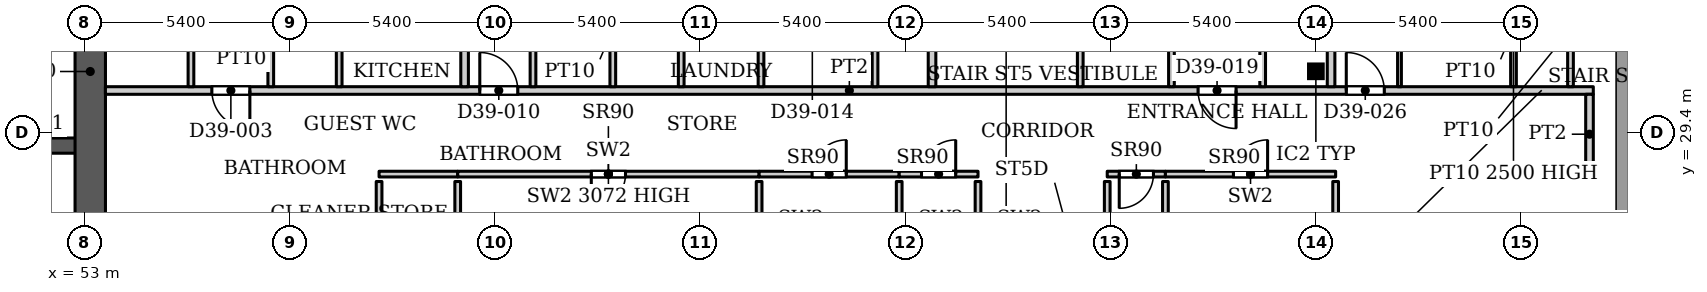
"""IFC4 building model, lengths in metres.
Left out: names, types, materials, properties, quantities, classifications, styles, units other than length and angle.
Written with IfcOpenShell. Run it as: python <this file> out.ifc"""

import sys

from ifc_helpers import new_model, si_unit, direction, frame, frame_2d, origin, origin_2d, place, context, subcontext, project, spatial, rectangle, hollow_rectangle, extrude, source, transform, mapped, element, fill, save


model = new_model("IFC4")
c1 = context("Model", 3, precision=1e-05, world=origin(), true_north=direction((0.0, 1.0)))
c2 = subcontext(c1, "Body", "Model", "MODEL_VIEW")
j1 = project(units=[si_unit("LENGTHUNIT", "METRE"), si_unit("PLANEANGLEUNIT", "RADIAN")], contexts=[c1])
p1 = place(None, origin())
s1 = spatial("IfcSite", under=j1, at=p1, CompositionType="ELEMENT")
p2 = place(p1, origin())
s2 = spatial("IfcBuilding", under=s1, at=p2, CompositionType="ELEMENT")
p3 = place(p2, frame((0.0, 0.0, 172.1)))
s3 = spatial("IfcBuildingStorey", under=s2, at=p3, CompositionType="ELEMENT", Elevation=172.1)
p4 = place(p3, frame((85.4, 31.005, 0.0), z_axis=(0.0, 0.0, 1.0), x_axis=(1.0, 0.0, 0.0)))
e1 = element("IfcColumn", 1, at=p4, inside=s3, PredefinedType="COLUMN", context=c2, shape_type="SweptSolid", body=[
    extrude(hollow_rectangle(XDim=0.305, YDim=0.305, WallThickness=0.016, InnerFilletRadius=0.016, OuterFilletRadius=0.032, at=origin_2d()), origin(), (0.0, 0.0, 1.0), 3.9),
])
p5 = place(p3, frame((34.75, 29.05, 0.0), z_axis=(0.0, 0.0, 1.0), x_axis=(1.0, 0.0, 0.0)))
e2 = element("IfcWall", 2, at=p5, inside=s3, PredefinedType="SHEAR", context=c2, shape_type="SweptSolid", body=[
    extrude(rectangle(XDim=18.4, YDim=0.4, at=frame_2d((9.2, 0.0))), origin(), (0.0, 0.0, 1.0), 3.9),
])
p6 = place(p5, frame((0.875, 0.0, 0.0)))
e3 = element("IfcOpeningElement", 3, at=p6, cuts=e2, PredefinedType="OPENING", context=c2, shape_type="SweptSolid", body=[
    extrude(rectangle(XDim=1.1, YDim=2.2, at=frame_2d((0.55, 1.1))), frame((0.0, 0.21, 0.0), z_axis=(0.0, -1.0, 0.0), x_axis=(1.0, 0.0, 0.0)), (0.0, 0.0, 1.0), 0.42),
])
p7 = place(p5, frame((3.725, 0.0, 0.0)))
e4 = element("IfcOpeningElement", 4, at=p7, cuts=e2, PredefinedType="OPENING", context=c2, shape_type="SweptSolid", body=[
    extrude(rectangle(XDim=1.1, YDim=2.2, at=frame_2d((0.55, 1.1))), frame((0.0, 0.21, 0.0), z_axis=(0.0, -1.0, 0.0), x_axis=(1.0, 0.0, 0.0)), (0.0, 0.0, 1.0), 0.42),
])
p8 = place(p5, frame((6.575, 0.0, 0.0)))
e5 = element("IfcOpeningElement", 5, at=p8, cuts=e2, PredefinedType="OPENING", context=c2, shape_type="SweptSolid", body=[
    extrude(rectangle(XDim=1.1, YDim=2.2, at=frame_2d((0.55, 1.1))), frame((0.0, 0.21, 0.0), z_axis=(0.0, -1.0, 0.0), x_axis=(1.0, 0.0, 0.0)), (0.0, 0.0, 1.0), 0.42),
])
p9 = place(p5, frame((9.425, 0.0, 0.0)))
e6 = element("IfcOpeningElement", 6, at=p9, cuts=e2, PredefinedType="OPENING", context=c2, shape_type="SweptSolid", body=[
    extrude(rectangle(XDim=1.1, YDim=2.2, at=frame_2d((0.55, 1.1))), frame((0.0, 0.21, 0.0), z_axis=(0.0, -1.0, 0.0), x_axis=(1.0, 0.0, 0.0)), (0.0, 0.0, 1.0), 0.42),
])
p10 = place(p5, frame((12.275, 0.0, 0.0)))
e7 = element("IfcOpeningElement", 7, at=p10, cuts=e2, PredefinedType="OPENING", context=c2, shape_type="SweptSolid", body=[
    extrude(rectangle(XDim=1.1, YDim=2.2, at=frame_2d((0.55, 1.1))), frame((0.0, 0.21, 0.0), z_axis=(0.0, -1.0, 0.0), x_axis=(1.0, 0.0, 0.0)), (0.0, 0.0, 1.0), 0.42),
])
p11 = place(p5, frame((15.125, 0.0, 0.0)))
e8 = element("IfcOpeningElement", 8, at=p11, cuts=e2, PredefinedType="OPENING", context=c2, shape_type="SweptSolid", body=[
    extrude(rectangle(XDim=1.1, YDim=2.2, at=frame_2d((0.55, 1.1))), frame((0.0, 0.21, 0.0), z_axis=(0.0, -1.0, 0.0), x_axis=(1.0, 0.0, 0.0)), (0.0, 0.0, 1.0), 0.42),
])
p12 = place(p3, frame((53.15, 25.8, 0.0), z_axis=(0.0, 0.0, 1.0), x_axis=(0.0, 1.0, 0.0)))
e9 = element("IfcWall", 9, at=p12, inside=s3, PredefinedType="SHEAR", context=c2, shape_type="SweptSolid", body=[
    extrude(rectangle(XDim=10.4, YDim=0.8, at=frame_2d((5.2, 0.0))), origin(), (0.0, 0.0, 1.0), 3.9),
])
p13 = place(p3, frame((60.75, 28.3, 0.0), z_axis=(0.0, 0.0, 1.0), x_axis=(1.0, 0.0, 0.0)))
e10 = element("IfcWall", 10, at=p13, inside=s3, PredefinedType="PARTITIONING", context=c2, shape_type="SweptSolid", body=[
    extrude(rectangle(XDim=2.069, YDim=0.15, at=frame_2d((1.035, 0.0))), origin(), (0.0, 0.0, 1.0), 3.9),
])
p14 = place(p3, frame((60.75, 23.075, 0.0), z_axis=(0.0, 0.0, 1.0), x_axis=(0.0, 1.0, 0.0)))
e11 = element("IfcWall", 11, at=p14, inside=s3, PredefinedType="PARTITIONING", context=c2, shape_type="SweptSolid", body=[
    extrude(rectangle(XDim=5.03, YDim=0.15, at=frame_2d((2.515, 0.0))), origin(), (0.0, 0.0, 1.0), 3.9),
])
p15 = place(p14, frame((2.387, 0.0, 0.0)))
e12 = element("IfcOpeningElement", 12, at=p15, cuts=e11, PredefinedType="OPENING", context=c2, shape_type="SweptSolid", body=[
    extrude(rectangle(XDim=0.9, YDim=2.2, at=frame_2d((0.45, 1.1))), frame((0.0, 0.085, 0.0), z_axis=(0.0, -1.0, 0.0), x_axis=(1.0, 0.0, 0.0)), (0.0, 0.0, 1.0), 0.17),
])
p16 = place(p3, frame((62.819, 22.966, 0.0), z_axis=(0.0, 0.0, 1.0), x_axis=(0.0, 1.0, 0.0)))
e13 = element("IfcWall", 13, at=p16, inside=s3, PredefinedType="PARTITIONING", context=c2, shape_type="SweptSolid", body=[
    extrude(rectangle(XDim=5.139, YDim=0.15, at=frame_2d((2.569, 0.0))), origin(), (0.0, 0.0, 1.0), 3.9),
])
p17 = place(p3, frame((62.819, 28.3, 0.0), z_axis=(0.0, 0.0, 1.0), x_axis=(1.0, 0.0, 0.0)))
e14 = element("IfcWall", 14, at=p17, inside=s3, PredefinedType="PARTITIONING", context=c2, shape_type="SweptSolid", body=[
    extrude(rectangle(XDim=7.931, YDim=0.15, at=frame_2d((3.965, 0.0))), origin(), (0.0, 0.0, 1.0), 3.072),
])
p18 = place(p17, frame((3.515, 0.0, 0.0)))
e15 = element("IfcOpeningElement", 15, at=p18, cuts=e14, PredefinedType="OPENING", context=c2, shape_type="SweptSolid", body=[
    extrude(rectangle(XDim=0.9, YDim=2.2, at=frame_2d((0.45, 1.1))), frame((0.0, 0.085, 0.0), z_axis=(0.0, -1.0, 0.0), x_axis=(1.0, 0.0, 0.0)), (0.0, 0.0, 1.0), 0.17),
])
p19 = place(p3, frame((70.75, 26.12, 0.0), z_axis=(0.0, 0.0, 1.0), x_axis=(0.0, 1.0, 0.0)))
e16 = element("IfcWall", 16, at=p19, inside=s3, PredefinedType="PARTITIONING", context=c2, shape_type="SweptSolid", body=[
    extrude(rectangle(XDim=1.985, YDim=0.15, at=frame_2d((0.992, 0.0))), origin(), (0.0, 0.0, 1.0), 3.9),
])
p20 = place(p3, frame((70.75, 28.3, 0.0), z_axis=(0.0, 0.0, 1.0), x_axis=(1.0, 0.0, 0.0)))
e17 = element("IfcWall", 17, at=p20, inside=s3, PredefinedType="PARTITIONING", context=c2, shape_type="SweptSolid", body=[
    extrude(rectangle(XDim=3.686, YDim=0.15, at=frame_2d((1.843, 0.0))), origin(), (0.0, 0.0, 1.0), 3.9),
])
p21 = place(p20, frame((1.393, 0.0, 0.0)))
e18 = element("IfcOpeningElement", 18, at=p21, cuts=e17, PredefinedType="OPENING", context=c2, shape_type="SweptSolid", body=[
    extrude(rectangle(XDim=0.9, YDim=2.2, at=frame_2d((0.45, 1.1))), frame((0.0, 0.085, 0.0), z_axis=(0.0, -1.0, 0.0), x_axis=(1.0, 0.0, 0.0)), (0.0, 0.0, 1.0), 0.17),
])
p22 = place(p3, frame((74.436, 26.12, 0.0), z_axis=(0.0, 0.0, 1.0), x_axis=(0.0, 1.0, 0.0)))
e19 = element("IfcWall", 19, at=p22, inside=s3, PredefinedType="PARTITIONING", context=c2, shape_type="SweptSolid", body=[
    extrude(rectangle(XDim=1.985, YDim=0.15, at=frame_2d((0.992, 0.0))), origin(), (0.0, 0.0, 1.0), 3.9),
])
p23 = place(p3, frame((74.436, 28.3, 0.0), z_axis=(0.0, 0.0, 1.0), x_axis=(1.0, 0.0, 0.0)))
e20 = element("IfcWall", 20, at=p23, inside=s3, PredefinedType="PARTITIONING", context=c2, shape_type="SweptSolid", body=[
    extrude(rectangle(XDim=2.074, YDim=0.15, at=frame_2d((1.037, 0.0))), origin(), (0.0, 0.0, 1.0), 3.9),
])
p24 = place(p23, frame((0.587, 0.0, 0.0)))
e21 = element("IfcOpeningElement", 21, at=p24, cuts=e20, PredefinedType="OPENING", context=c2, shape_type="SweptSolid", body=[
    extrude(rectangle(XDim=0.9, YDim=2.2, at=frame_2d((0.45, 1.1))), frame((0.0, 0.085, 0.0), z_axis=(0.0, -1.0, 0.0), x_axis=(1.0, 0.0, 0.0)), (0.0, 0.0, 1.0), 0.17),
])
p25 = place(p3, frame((76.51, 26.12, 0.0), z_axis=(0.0, 0.0, 1.0), x_axis=(0.0, 1.0, 0.0)))
e22 = element("IfcWall", 22, at=p25, inside=s3, PredefinedType="PARTITIONING", context=c2, shape_type="SweptSolid", body=[
    extrude(rectangle(XDim=1.985, YDim=0.15, at=frame_2d((0.992, 0.0))), origin(), (0.0, 0.0, 1.0), 3.9),
])
p26 = place(p3, frame((79.91, 28.3, 0.0), z_axis=(0.0, 0.0, 1.0), x_axis=(1.0, 0.0, 0.0)))
e23 = element("IfcWall", 23, at=p26, inside=s3, PredefinedType="PARTITIONING", context=c2, shape_type="SweptSolid", body=[
    extrude(rectangle(XDim=1.531, YDim=0.15, at=frame_2d((0.766, 0.0))), origin(), (0.0, 0.0, 1.0), 3.9),
])
p27 = place(p26, frame((0.316, 0.0, 0.0)))
e24 = element("IfcOpeningElement", 24, at=p27, cuts=e23, PredefinedType="OPENING", context=c2, shape_type="SweptSolid", body=[
    extrude(rectangle(XDim=0.9, YDim=2.2, at=frame_2d((0.45, 1.1))), frame((0.0, 0.085, 0.0), z_axis=(0.0, -1.0, 0.0), x_axis=(1.0, 0.0, 0.0)), (0.0, 0.0, 1.0), 0.17),
])
p28 = place(p3, frame((79.91, 26.12, 0.0), z_axis=(0.0, 0.0, 1.0), x_axis=(0.0, 1.0, 0.0)))
e25 = element("IfcWall", 25, at=p28, inside=s3, PredefinedType="PARTITIONING", context=c2, shape_type="SweptSolid", body=[
    extrude(rectangle(XDim=1.985, YDim=0.15, at=frame_2d((0.992, 0.0))), origin(), (0.0, 0.0, 1.0), 3.9),
])
p29 = place(p3, frame((81.441, 25.62, 0.0), z_axis=(0.0, 0.0, 1.0), x_axis=(0.0, 1.0, 0.0)))
e26 = element("IfcWall", 26, at=p29, inside=s3, PredefinedType="PARTITIONING", context=c2, shape_type="SweptSolid", body=[
    extrude(rectangle(XDim=2.485, YDim=0.15, at=frame_2d((1.242, 0.0))), origin(), (0.0, 0.0, 1.0), 3.9),
])
p30 = place(p3, frame((81.441, 28.3, 0.0), z_axis=(0.0, 0.0, 1.0), x_axis=(1.0, 0.0, 0.0)))
e27 = element("IfcWall", 27, at=p30, inside=s3, PredefinedType="PARTITIONING", context=c2, shape_type="SweptSolid", body=[
    extrude(rectangle(XDim=4.479, YDim=0.15, at=frame_2d((2.24, 0.0))), origin(), (0.0, 0.0, 1.0), 3.9),
])
p31 = place(p30, frame((1.789, 0.0, 0.0)))
e28 = element("IfcOpeningElement", 28, at=p31, cuts=e27, PredefinedType="OPENING", context=c2, shape_type="SweptSolid", body=[
    extrude(rectangle(XDim=0.9, YDim=2.2, at=frame_2d((0.45, 1.1))), frame((0.0, 0.085, 0.0), z_axis=(0.0, -1.0, 0.0), x_axis=(1.0, 0.0, 0.0)), (0.0, 0.0, 1.0), 0.17),
])
p32 = place(p3, frame((85.92, 25.62, 0.0), z_axis=(0.0, 0.0, 1.0), x_axis=(0.0, 1.0, 0.0)))
e29 = element("IfcWall", 29, at=p32, inside=s3, PredefinedType="PARTITIONING", context=c2, shape_type="SweptSolid", body=[
    extrude(rectangle(XDim=2.485, YDim=0.15, at=frame_2d((1.242, 0.0))), origin(), (0.0, 0.0, 1.0), 3.9),
])
p33 = place(p3, frame((53.549, 30.5, 0.0), z_axis=(0.0, 0.0, 1.0), x_axis=(1.0, 0.0, 0.0)))
e30 = element("IfcWall", 30, at=p33, inside=s3, PredefinedType="PARTITIONING", context=c2, shape_type="SweptSolid", body=[
    extrude(rectangle(XDim=39.151, YDim=0.2, at=frame_2d((19.575, 0.0))), origin(), (0.0, 0.0, 1.0), 3.6),
])
p34 = place(p33, frame((2.801, 0.0, 0.0)))
e31 = element("IfcOpeningElement", 31, at=p34, cuts=e30, PredefinedType="OPENING", context=c2, shape_type="SweptSolid", body=[
    extrude(rectangle(XDim=1.0, YDim=2.1, at=frame_2d((0.5, 1.05))), frame((0.0, 0.11, 0.0), z_axis=(0.0, -1.0, 0.0), x_axis=(1.0, 0.0, 0.0)), (0.0, 0.0, 1.0), 0.22),
])
p35 = place(p33, frame((9.851, 0.0, 0.0)))
e32 = element("IfcOpeningElement", 32, at=p35, cuts=e30, PredefinedType="OPENING", context=c2, shape_type="SweptSolid", body=[
    extrude(rectangle(XDim=1.0, YDim=2.1, at=frame_2d((0.5, 1.05))), frame((0.0, 0.11, 0.0), z_axis=(0.0, -1.0, 0.0), x_axis=(1.0, 0.0, 0.0)), (0.0, 0.0, 1.0), 0.22),
])
p36 = place(p33, frame((28.751, 0.0, 0.0)))
e33 = element("IfcOpeningElement", 33, at=p36, cuts=e30, PredefinedType="OPENING", context=c2, shape_type="SweptSolid", body=[
    extrude(rectangle(XDim=1.0, YDim=2.1, at=frame_2d((0.5, 1.05))), frame((0.0, 0.11, 0.0), z_axis=(0.0, -1.0, 0.0), x_axis=(1.0, 0.0, 0.0)), (0.0, 0.0, 1.0), 0.22),
])
p37 = place(p33, frame((32.651, 0.0, 0.0)))
e34 = element("IfcOpeningElement", 34, at=p37, cuts=e30, PredefinedType="OPENING", context=c2, shape_type="SweptSolid", body=[
    extrude(rectangle(XDim=1.0, YDim=2.1, at=frame_2d((0.5, 1.05))), frame((0.0, 0.11, 0.0), z_axis=(0.0, -1.0, 0.0), x_axis=(1.0, 0.0, 0.0)), (0.0, 0.0, 1.0), 0.22),
])
p38 = place(p3, frame((55.8, 30.6, 0.0), z_axis=(0.0, 0.0, 1.0), x_axis=(0.0, 1.0, 0.0)))
e35 = element("IfcWall", 35, at=p38, inside=s3, PredefinedType="PARTITIONING", context=c2, shape_type="SweptSolid", body=[
    extrude(rectangle(XDim=3.175, YDim=0.15, at=frame_2d((1.587, 0.0))), origin(), (0.0, 0.0, 1.0), 3.6),
])
for number, where, z_axis, x_axis in (
    (36, (57.9, 30.6, 0.0), (0.0, 0.0, 1.0), (0.0, 1.0, 0.0)),
    (37, (59.7, 30.6, 0.0), (0.0, 0.0, 1.0), (0.0, 1.0, 0.0)),
):
    element("IfcWall", number, at=place(p3, frame(where, z_axis=z_axis, x_axis=x_axis)), inside=s3, PredefinedType="PARTITIONING", context=c2, shape_type="SweptSolid", body=[
        extrude(rectangle(XDim=3.025, YDim=0.15, at=frame_2d((1.512, 0.0))), origin(), (0.0, 0.0, 1.0), 3.6),
    ])
p39 = place(p3, frame((63.0, 30.6, 0.0), z_axis=(0.0, 0.0, 1.0), x_axis=(0.0, 1.0, 0.0)))
e38 = element("IfcWall", 38, at=p39, inside=s3, PredefinedType="PARTITIONING", context=c2, shape_type="SweptSolid", body=[
    extrude(rectangle(XDim=13.3, YDim=0.2, at=frame_2d((6.65, 0.0))), origin(), (0.0, 0.0, 1.0), 3.6),
])
for number, where, z_axis, x_axis in (
    (39, (64.8, 30.6, 0.0), (0.0, 0.0, 1.0), (0.0, 1.0, 0.0)),
    (40, (66.9, 30.6, 0.0), (0.0, 0.0, 1.0), (0.0, 1.0, 0.0)),
    (41, (68.7, 30.6, 0.0), (0.0, 0.0, 1.0), (0.0, 1.0, 0.0)),
    (42, (70.8, 30.6, 0.0), (0.0, 0.0, 1.0), (0.0, 1.0, 0.0)),
    (43, (73.8, 30.6, 0.0), (0.0, 0.0, 1.0), (0.0, 1.0, 0.0)),
):
    element("IfcWall", number, at=place(p3, frame(where, z_axis=z_axis, x_axis=x_axis)), inside=s3, PredefinedType="PARTITIONING", context=c2, shape_type="SweptSolid", body=[
        extrude(rectangle(XDim=3.025, YDim=0.15, at=frame_2d((1.512, 0.0))), origin(), (0.0, 0.0, 1.0), 3.6),
    ])
p40 = place(p3, frame((75.3, 30.6, 0.0), z_axis=(0.0, 0.0, 1.0), x_axis=(0.0, 1.0, 0.0)))
e44 = element("IfcWall", 44, at=p40, inside=s3, PredefinedType="PARTITIONING", context=c2, shape_type="SweptSolid", body=[
    extrude(rectangle(XDim=13.3, YDim=0.2, at=frame_2d((6.65, 0.0))), origin(), (0.0, 0.0, 1.0), 3.6),
])
for number, where, z_axis, x_axis in (
    (45, (79.2, 30.6, 0.0), (0.0, 0.0, 1.0), (0.0, 1.0, 0.0)),
    (46, (81.6, 30.6, 0.0), (0.0, 0.0, 1.0), (0.0, 1.0, 0.0)),
):
    element("IfcWall", number, at=place(p3, frame(where, z_axis=z_axis, x_axis=x_axis)), inside=s3, PredefinedType="PARTITIONING", context=c2, shape_type="SweptSolid", body=[
        extrude(rectangle(XDim=3.025, YDim=0.15, at=frame_2d((1.512, 0.0))), origin(), (0.0, 0.0, 1.0), 3.6),
    ])
p41 = place(p3, frame((84.0, 30.6, 0.0), z_axis=(0.0, 0.0, 1.0), x_axis=(0.0, 1.0, 0.0)))
e47 = element("IfcWall", 47, at=p41, inside=s3, PredefinedType="PARTITIONING", context=c2, shape_type="SweptSolid", body=[
    extrude(rectangle(XDim=3.175, YDim=0.15, at=frame_2d((1.587, 0.0))), origin(), (0.0, 0.0, 1.0), 3.6),
])
p42 = place(p3, frame((85.8, 30.6, 0.0), z_axis=(0.0, 0.0, 1.0), x_axis=(0.0, 1.0, 0.0)))
e48 = element("IfcWall", 48, at=p42, inside=s3, PredefinedType="PARTITIONING", context=c2, shape_type="SweptSolid", body=[
    extrude(rectangle(XDim=13.3, YDim=0.2, at=frame_2d((6.65, 0.0))), origin(), (0.0, 0.0, 1.0), 3.6),
])
p43 = place(p3, frame((87.6, 30.6, 0.0), z_axis=(0.0, 0.0, 1.0), x_axis=(0.0, 1.0, 0.0)))
e49 = element("IfcWall", 49, at=p43, inside=s3, PredefinedType="PARTITIONING", context=c2, shape_type="SweptSolid", body=[
    extrude(rectangle(XDim=3.025, YDim=0.1, at=frame_2d((1.512, 0.0))), origin(), (0.0, 0.0, 1.0), 3.6),
])
p44 = place(p3, frame((90.6, 30.6, 0.0), z_axis=(0.0, 0.0, 1.0), x_axis=(0.0, 1.0, 0.0)))
e50 = element("IfcWall", 50, at=p44, inside=s3, PredefinedType="PARTITIONING", context=c2, shape_type="SweptSolid", body=[
    extrude(rectangle(XDim=3.025, YDim=0.15, at=frame_2d((1.512, 0.0))), origin(), (0.0, 0.0, 1.0), 2.5),
])
p45 = place(p3, frame((92.1, 30.6, 0.0), z_axis=(0.0, 0.0, 1.0), x_axis=(0.0, 1.0, 0.0)))
e51 = element("IfcWall", 51, at=p45, inside=s3, PredefinedType="PARTITIONING", context=c2, shape_type="SweptSolid", body=[
    extrude(rectangle(XDim=3.025, YDim=0.15, at=frame_2d((1.512, 0.0))), origin(), (0.0, 0.0, 1.0), 3.6),
])
p46 = place(p3, frame((92.6, 28.3, 0.0), z_axis=(0.0, 0.0, 1.0), x_axis=(0.0, 1.0, 0.0)))
e52 = element("IfcWall", 52, at=p46, inside=s3, PredefinedType="PARTITIONING", context=c2, shape_type="SweptSolid", body=[
    extrude(rectangle(XDim=2.1, YDim=0.2, at=frame_2d((1.05, 0.0))), origin(), (0.0, 0.0, 1.0), 3.6),
])
m1 = source(origin(), c2, "Body", "SweptSolid", [
    extrude(rectangle(XDim=0.9, YDim=2.2, at=frame_2d((0.45, 1.1))), frame((0.0, 0.025, 0.0), z_axis=(0.0, -1.0, 0.0), x_axis=(1.0, 0.0, 0.0)), (0.0, 0.0, 1.0), 0.05),
])
p47 = place(p18, origin())
e53 = element("IfcDoor", 53, at=p47, inside=s3, OperationType="SINGLE_SWING_RIGHT", PredefinedType="DOOR", context=c2, shape_type="MappedRepresentation", body=[
    mapped(m1, transform((0.0, 0.0, 0.0), x_axis=(1.0, 0.0, 0.0), y_axis=(0.0, 1.0, 0.0), z_axis=(0.0, 0.0, 1.0), scale=1.0)),
])
fill(e15, e53)
p48 = place(p21, origin())
e54 = element("IfcDoor", 54, at=p48, inside=s3, OperationType="SINGLE_SWING_LEFT", PredefinedType="DOOR", context=c2, shape_type="MappedRepresentation", body=[
    mapped(m1, transform((0.0, 0.0, 0.0), x_axis=(1.0, 0.0, 0.0), y_axis=(0.0, 1.0, 0.0), z_axis=(0.0, 0.0, 1.0), scale=1.0)),
])
fill(e18, e54)
p49 = place(p24, origin())
e55 = element("IfcDoor", 55, at=p49, inside=s3, OperationType="SINGLE_SWING_LEFT", PredefinedType="DOOR", context=c2, shape_type="MappedRepresentation", body=[
    mapped(m1, transform((0.0, 0.0, 0.0), x_axis=(1.0, 0.0, 0.0), y_axis=(0.0, 1.0, 0.0), z_axis=(0.0, 0.0, 1.0), scale=1.0)),
])
fill(e21, e55)
p50 = place(p27, origin())
e56 = element("IfcDoor", 56, at=p50, inside=s3, OperationType="SINGLE_SWING_RIGHT", PredefinedType="DOOR", context=c2, shape_type="MappedRepresentation", body=[
    mapped(m1, transform((0.0, 0.0, 0.0), x_axis=(1.0, 0.0, 0.0), y_axis=(0.0, 1.0, 0.0), z_axis=(0.0, 0.0, 1.0), scale=1.0)),
])
fill(e24, e56)
p51 = place(p31, origin())
e57 = element("IfcDoor", 57, at=p51, inside=s3, OperationType="SINGLE_SWING_LEFT", PredefinedType="DOOR", context=c2, shape_type="MappedRepresentation", body=[
    mapped(m1, transform((0.0, 0.0, 0.0), x_axis=(1.0, 0.0, 0.0), y_axis=(0.0, 1.0, 0.0), z_axis=(0.0, 0.0, 1.0), scale=1.0)),
])
fill(e28, e57)
m2 = source(origin(), c2, "Body", "SweptSolid", [
    extrude(rectangle(XDim=1.0, YDim=2.1, at=frame_2d((0.5, 1.05))), frame((0.0, 0.025, 0.0), z_axis=(0.0, -1.0, 0.0), x_axis=(1.0, 0.0, 0.0)), (0.0, 0.0, 1.0), 0.05),
])
p52 = place(p34, origin())
e58 = element("IfcDoor", 58, at=p52, inside=s3, OperationType="SINGLE_SWING_RIGHT", PredefinedType="DOOR", context=c2, shape_type="MappedRepresentation", body=[
    mapped(m2, transform((0.0, 0.0, 0.0), x_axis=(1.0, 0.0, 0.0), y_axis=(0.0, 1.0, 0.0), z_axis=(0.0, 0.0, 1.0), scale=1.0)),
])
fill(e31, e58)
p53 = place(p35, origin())
e59 = element("IfcDoor", 59, at=p53, inside=s3, OperationType="SINGLE_SWING_LEFT", PredefinedType="DOOR", context=c2, shape_type="MappedRepresentation", body=[
    mapped(m2, transform((0.0, 0.0, 0.0), x_axis=(1.0, 0.0, 0.0), y_axis=(0.0, 1.0, 0.0), z_axis=(0.0, 0.0, 1.0), scale=1.0)),
])
fill(e32, e59)
p54 = place(p36, origin())
e60 = element("IfcDoor", 60, at=p54, inside=s3, OperationType="SINGLE_SWING_RIGHT", PredefinedType="DOOR", context=c2, shape_type="MappedRepresentation", body=[
    mapped(m2, transform((0.0, 0.0, 0.0), x_axis=(1.0, 0.0, 0.0), y_axis=(0.0, 1.0, 0.0), z_axis=(0.0, 0.0, 1.0), scale=1.0)),
])
fill(e33, e60)
p55 = place(p37, origin())
e61 = element("IfcDoor", 61, at=p55, inside=s3, OperationType="SINGLE_SWING_LEFT", PredefinedType="DOOR", context=c2, shape_type="MappedRepresentation", body=[
    mapped(m2, transform((0.0, 0.0, 0.0), x_axis=(1.0, 0.0, 0.0), y_axis=(0.0, 1.0, 0.0), z_axis=(0.0, 0.0, 1.0), scale=1.0)),
])
fill(e34, e61)
save(model, sys.argv[1])
